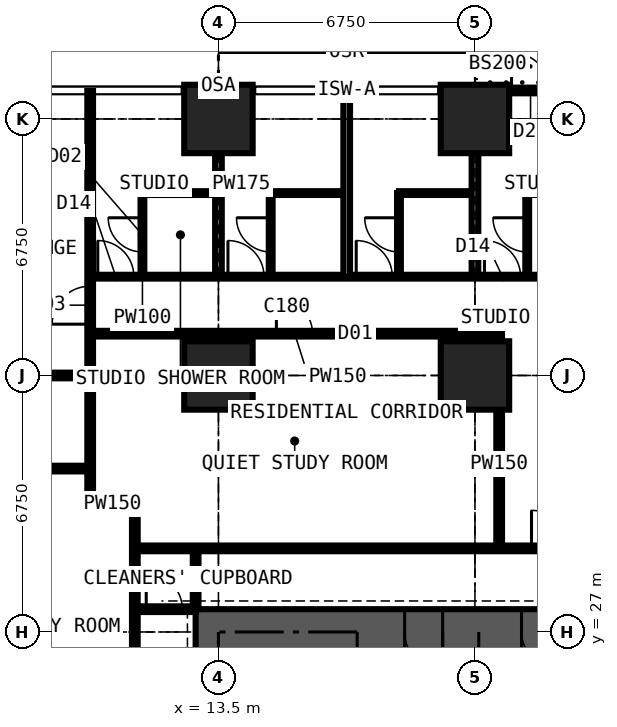
"""IFC4 building model, lengths in metres.
Left out: names, types, materials, properties, quantities, classifications, styles, units other than length and angle.
Written with IfcOpenShell. Run it as: python <this file> out.ifc"""

import sys

from ifc_helpers import new_model, si_unit, direction, frame, frame_2d, origin, origin_2d, place, context, subcontext, project, spatial, rectangle, extrude, element, fill, save


model = new_model("IFC4")
c1 = context("Model", 3, precision=1e-05, world=origin(), true_north=direction((0.0, 1.0)))
c2 = subcontext(c1, "Body", "Model", "MODEL_VIEW")
j1 = project(units=[si_unit("LENGTHUNIT", "METRE"), si_unit("PLANEANGLEUNIT", "RADIAN")], contexts=[c1])
p1 = place(None, origin())
s1 = spatial("IfcSite", under=j1, at=p1, CompositionType="ELEMENT")
p2 = place(p1, origin())
s2 = spatial("IfcBuilding", under=s1, at=p2, CompositionType="ELEMENT")
p3 = place(p2, frame((0.0, 0.0, 50.4)))
s3 = spatial("IfcBuildingStorey", under=s2, at=p3, CompositionType="ELEMENT", Elevation=50.4)
for number, where, z_axis, x_axis in (
    (1, (13.5, 33.75, 0.0), (0.0, 0.0, 1.0), (1.0, 0.0, 0.0)),
    (2, (13.5, 40.5, 0.0), (0.0, 0.0, 1.0), (1.0, 0.0, 0.0)),
    (3, (20.25, 33.75, 0.0), (0.0, 0.0, 1.0), (1.0, 0.0, 0.0)),
    (4, (20.25, 40.5, 0.0), (0.0, 0.0, 1.0), (1.0, 0.0, 0.0)),
):
    element("IfcColumn", number, at=place(p3, frame(where, z_axis=z_axis, x_axis=x_axis)), inside=s3, PredefinedType="COLUMN", context=c2, shape_type="SweptSolid", body=[
        extrude(rectangle(XDim=1.8, YDim=1.8, at=origin_2d()), origin(), (0.0, 0.0, 1.0), 3.6),
    ])
p4 = place(p3, frame((27.6, 27.0, 0.0), z_axis=(0.0, 0.0, 1.0), x_axis=(-1.0, 0.0, 0.0)))
e5 = element("IfcWall", 5, at=p4, inside=s3, PredefinedType="SHEAR", context=c2, shape_type="SweptSolid", body=[
    extrude(rectangle(XDim=14.7, YDim=1.2, at=frame_2d((7.35, 0.0))), origin(), (0.0, 0.0, 1.0), 3.6),
])
p5 = place(p4, frame((5.225, 0.0, 0.0)))
e6 = element("IfcOpeningElement", 6, at=p5, cuts=e5, PredefinedType="OPENING", context=c2, shape_type="SweptSolid", body=[
    extrude(rectangle(XDim=0.9, YDim=2.2, at=frame_2d((0.45, 1.1))), frame((0.0, 0.61, 0.0), z_axis=(0.0, -1.0, 0.0), x_axis=(1.0, 0.0, 0.0)), (0.0, 0.0, 1.0), 1.22),
])
p6 = place(p4, frame((8.2, 0.0, 0.0)))
e7 = element("IfcOpeningElement", 7, at=p6, cuts=e5, PredefinedType="OPENING", context=c2, shape_type="SweptSolid", body=[
    extrude(rectangle(XDim=1.0, YDim=2.2, at=frame_2d((0.5, 1.1))), frame((0.0, 0.61, 0.0), z_axis=(0.0, -1.0, 0.0), x_axis=(1.0, 0.0, 0.0)), (0.0, 0.0, 1.0), 1.22),
])
p7 = place(p3, frame((20.25, 41.25, 0.0), z_axis=(0.0, 0.0, 1.0), x_axis=(1.0, 0.0, 0.0)))
e8 = element("IfcWall", 8, at=p7, inside=s3, PredefinedType="SOLIDWALL", context=c2, shape_type="SweptSolid", body=[
    extrude(rectangle(XDim=6.75, YDim=0.15, at=frame_2d((3.375, 0.0))), origin(), (0.0, 0.0, 1.0), 3.375),
])
p8 = place(p7, frame((0.962, 0.0, 0.0)))
e9 = element("IfcOpeningElement", 9, at=p8, cuts=e8, PredefinedType="OPENING", context=c2, shape_type="SweptSolid", body=[
    extrude(rectangle(XDim=1.0, YDim=2.2, at=frame_2d((0.5, 1.1))), frame((0.0, 0.085, 0.0), z_axis=(0.0, -1.0, 0.0), x_axis=(1.0, 0.0, 0.0)), (0.0, 0.0, 1.0), 0.17),
])
p9 = place(p7, frame((2.025, 0.0, 0.9)))
e10 = element("IfcOpeningElement", 10, at=p9, cuts=e8, PredefinedType="OPENING", context=c2, shape_type="SweptSolid", body=[
    extrude(rectangle(XDim=1.2, YDim=1.8, at=frame_2d((0.6, 0.9))), frame((0.0, 0.085, 0.0), z_axis=(0.0, -1.0, 0.0), x_axis=(1.0, 0.0, 0.0)), (0.0, 0.0, 1.0), 0.17),
])
p10 = place(p7, frame((4.788, 0.0, 0.0)))
e11 = element("IfcOpeningElement", 11, at=p10, cuts=e8, PredefinedType="OPENING", context=c2, shape_type="SweptSolid", body=[
    extrude(rectangle(XDim=1.0, YDim=2.2, at=frame_2d((0.5, 1.1))), frame((0.0, 0.085, 0.0), z_axis=(0.0, -1.0, 0.0), x_axis=(1.0, 0.0, 0.0)), (0.0, 0.0, 1.0), 0.17),
])
p11 = place(p7, frame((3.525, 0.0, 0.9)))
e12 = element("IfcOpeningElement", 12, at=p11, cuts=e8, PredefinedType="OPENING", context=c2, shape_type="SweptSolid", body=[
    extrude(rectangle(XDim=1.2, YDim=1.8, at=frame_2d((0.6, 0.9))), frame((0.0, 0.085, 0.0), z_axis=(0.0, -1.0, 0.0), x_axis=(1.0, 0.0, 0.0)), (0.0, 0.0, 1.0), 0.17),
])
p12 = place(p3, frame((-0.734, 33.75, 0.0), z_axis=(0.0, 0.0, 1.0), x_axis=(1.0, 0.0, 0.0)))
e13 = element("IfcWall", 13, at=p12, inside=s3, PredefinedType="PARTITIONING", context=c2, shape_type="SweptSolid", body=[
    extrude(rectangle(XDim=10.859, YDim=0.15, at=frame_2d((5.429, 0.0))), origin(), (0.0, 0.0, 1.0), 2.877),
])
p13 = place(p3, frame((5.65, 31.3, 0.0), z_axis=(0.0, 0.0, 1.0), x_axis=(1.0, 0.0, 0.0)))
e14 = element("IfcWall", 14, at=p13, inside=s3, PredefinedType="PARTITIONING", context=c2, shape_type="SweptSolid", body=[
    extrude(rectangle(XDim=4.475, YDim=0.15, at=frame_2d((2.238, 0.0))), origin(), (0.0, 0.0, 1.0), 3.375),
])
p14 = place(p3, frame((10.125, 30.375, 0.0), z_axis=(0.0, 0.0, 1.0), x_axis=(0.0, 1.0, 0.0)))
e15 = element("IfcWall", 15, at=p14, inside=s3, PredefinedType="PARTITIONING", context=c2, shape_type="SweptSolid", body=[
    extrude(rectangle(XDim=10.859, YDim=0.15, at=frame_2d((5.429, 0.0))), origin(), (0.0, 0.0, 1.0), 3.375),
])
p15 = place(p14, frame((4.725, 0.0, 0.0)))
e16 = element("IfcOpeningElement", 16, at=p15, cuts=e15, PredefinedType="OPENING", context=c2, shape_type="SweptSolid", body=[
    extrude(rectangle(XDim=1.0, YDim=2.2, at=frame_2d((0.5, 1.1))), frame((0.0, 0.085, 0.0), z_axis=(0.0, -1.0, 0.0), x_axis=(1.0, 0.0, 0.0)), (0.0, 0.0, 1.0), 0.17),
])
p16 = place(p3, frame((10.125, 30.375, 0.0), z_axis=(0.0, 0.0, 1.0), x_axis=(1.0, 0.0, 0.0)))
e17 = element("IfcWall", 17, at=p16, inside=s3, PredefinedType="PARTITIONING", context=c2, shape_type="SweptSolid", body=[
    extrude(rectangle(XDim=1.175, YDim=0.15, at=frame_2d((0.587, 0.0))), origin(), (0.0, 0.0, 1.0), 3.375),
])
p17 = place(p3, frame((10.125, 34.85, 0.0), z_axis=(0.0, 0.0, 1.0), x_axis=(1.0, 0.0, 0.0)))
e18 = element("IfcWall", 18, at=p17, inside=s3, PredefinedType="PARTITIONING", context=c2, shape_type="SweptSolid", body=[
    extrude(rectangle(XDim=10.762, YDim=0.15, at=frame_2d((5.381, 0.0))), origin(), (0.0, 0.0, 1.0), 3.375),
])
p18 = place(p17, frame((4.9, 0.0, 0.0)))
e19 = element("IfcOpeningElement", 19, at=p18, cuts=e18, PredefinedType="OPENING", context=c2, shape_type="SweptSolid", body=[
    extrude(rectangle(XDim=0.95, YDim=2.2, at=frame_2d((0.475, 1.1))), frame((0.0, 0.085, 0.0), z_axis=(0.0, -1.0, 0.0), x_axis=(1.0, 0.0, 0.0)), (0.0, 0.0, 1.0), 0.17),
])
p19 = place(p3, frame((10.125, 36.35, 0.0), z_axis=(0.0, 0.0, 1.0), x_axis=(1.0, 0.0, 0.0)))
e20 = element("IfcWall", 20, at=p19, inside=s3, PredefinedType="PARTITIONING", context=c2, shape_type="SweptSolid", body=[
    extrude(rectangle(XDim=23.625, YDim=0.1, at=frame_2d((11.812, 0.0))), origin(), (0.0, 0.0, 1.0), 3.375),
])
p20 = place(p19, frame((21.45, 0.0, 0.0)))
e21 = element("IfcOpeningElement", 21, at=p20, cuts=e20, PredefinedType="OPENING", context=c2, shape_type="SweptSolid", body=[
    extrude(rectangle(XDim=1.0, YDim=2.2, at=frame_2d((0.5, 1.1))), frame((0.0, 0.06, 0.0), z_axis=(0.0, -1.0, 0.0), x_axis=(1.0, 0.0, 0.0)), (0.0, 0.0, 1.0), 0.12),
])
p21 = place(p19, frame((17.125, 0.0, 0.0)))
e22 = element("IfcOpeningElement", 22, at=p21, cuts=e20, PredefinedType="OPENING", context=c2, shape_type="SweptSolid", body=[
    extrude(rectangle(XDim=0.95, YDim=2.2, at=frame_2d((0.475, 1.1))), frame((0.0, 0.06, 0.0), z_axis=(0.0, -1.0, 0.0), x_axis=(1.0, 0.0, 0.0)), (0.0, 0.0, 1.0), 0.12),
])
p22 = place(p19, frame((13.7, 0.0, 0.0)))
e23 = element("IfcOpeningElement", 23, at=p22, cuts=e20, PredefinedType="OPENING", context=c2, shape_type="SweptSolid", body=[
    extrude(rectangle(XDim=0.95, YDim=2.2, at=frame_2d((0.475, 1.1))), frame((0.0, 0.06, 0.0), z_axis=(0.0, -1.0, 0.0), x_axis=(1.0, 0.0, 0.0)), (0.0, 0.0, 1.0), 0.12),
])
p23 = place(p19, frame((0.2, 0.0, 0.0)))
e24 = element("IfcOpeningElement", 24, at=p23, cuts=e20, PredefinedType="OPENING", context=c2, shape_type="SweptSolid", body=[
    extrude(rectangle(XDim=0.95, YDim=2.2, at=frame_2d((0.475, 1.1))), frame((0.0, 0.06, 0.0), z_axis=(0.0, -1.0, 0.0), x_axis=(1.0, 0.0, 0.0)), (0.0, 0.0, 1.0), 0.12),
])
p24 = place(p19, frame((3.625, 0.0, 0.0)))
e25 = element("IfcOpeningElement", 25, at=p24, cuts=e20, PredefinedType="OPENING", context=c2, shape_type="SweptSolid", body=[
    extrude(rectangle(XDim=0.95, YDim=2.2, at=frame_2d((0.475, 1.1))), frame((0.0, 0.06, 0.0), z_axis=(0.0, -1.0, 0.0), x_axis=(1.0, 0.0, 0.0)), (0.0, 0.0, 1.0), 0.12),
])
p25 = place(p19, frame((7.0, 0.0, 0.0)))
e26 = element("IfcOpeningElement", 26, at=p25, cuts=e20, PredefinedType="OPENING", context=c2, shape_type="SweptSolid", body=[
    extrude(rectangle(XDim=0.95, YDim=2.2, at=frame_2d((0.475, 1.1))), frame((0.0, 0.06, 0.0), z_axis=(0.0, -1.0, 0.0), x_axis=(1.0, 0.0, 0.0)), (0.0, 0.0, 1.0), 0.12),
])
p26 = place(p19, frame((10.375, 0.0, 0.0)))
e27 = element("IfcOpeningElement", 27, at=p26, cuts=e20, PredefinedType="OPENING", context=c2, shape_type="SweptSolid", body=[
    extrude(rectangle(XDim=0.95, YDim=2.2, at=frame_2d((0.475, 1.1))), frame((0.0, 0.06, 0.0), z_axis=(0.0, -1.0, 0.0), x_axis=(1.0, 0.0, 0.0)), (0.0, 0.0, 1.0), 0.12),
])
p27 = place(p3, frame((11.3, 11.3, 0.0), z_axis=(0.0, 0.0, 1.0), x_axis=(0.0, 1.0, 0.0)))
e28 = element("IfcWall", 28, at=p27, inside=s3, PredefinedType="PARTITIONING", context=c2, shape_type="SweptSolid", body=[
    extrude(rectangle(XDim=19.075, YDim=0.15, at=frame_2d((9.538, 0.0))), origin(), (0.0, 0.0, 1.0), 3.375),
])
p28 = place(p27, frame((10.137, 0.0, 0.0)))
e29 = element("IfcOpeningElement", 29, at=p28, cuts=e28, PredefinedType="OPENING", context=c2, shape_type="SweptSolid", body=[
    extrude(rectangle(XDim=1.0, YDim=2.2, at=frame_2d((0.5, 1.1))), frame((0.0, 0.085, 0.0), z_axis=(0.0, -1.0, 0.0), x_axis=(1.0, 0.0, 0.0)), (0.0, 0.0, 1.0), 0.17),
])
p29 = place(p3, frame((11.3, 27.6, 0.0), z_axis=(0.0, 0.0, 1.0), x_axis=(1.0, 0.0, 0.0)))
e30 = element("IfcWall", 30, at=p29, inside=s3, PredefinedType="PARTITIONING", context=c2, shape_type="SweptSolid", body=[
    extrude(rectangle(XDim=1.6, YDim=0.15, at=frame_2d((0.8, 0.0))), origin(), (0.0, 0.0, 1.0), 2.877),
])
p30 = place(p29, frame((0.3, 0.0, 0.0)))
e31 = element("IfcOpeningElement", 31, at=p30, cuts=e30, PredefinedType="OPENING", context=c2, shape_type="SweptSolid", body=[
    extrude(rectangle(XDim=0.95, YDim=2.2, at=frame_2d((0.475, 1.1))), frame((0.0, 0.085, 0.0), z_axis=(0.0, -1.0, 0.0), x_axis=(1.0, 0.0, 0.0)), (0.0, 0.0, 1.0), 0.17),
])
p31 = place(p3, frame((11.3, 29.2, 0.0), z_axis=(0.0, 0.0, 1.0), x_axis=(1.0, 0.0, 0.0)))
e32 = element("IfcWall", 32, at=p31, inside=s3, PredefinedType="PARTITIONING", context=c2, shape_type="SweptSolid", body=[
    extrude(rectangle(XDim=19.075, YDim=0.15, at=frame_2d((9.538, 0.0))), origin(), (0.0, 0.0, 1.0), 3.375),
])
p32 = place(p31, frame((12.875, 0.0, 0.0)))
e33 = element("IfcOpeningElement", 33, at=p32, cuts=e32, PredefinedType="OPENING", context=c2, shape_type="SweptSolid", body=[
    extrude(rectangle(XDim=1.0, YDim=2.2, at=frame_2d((0.5, 1.1))), frame((0.0, 0.085, 0.0), z_axis=(0.0, -1.0, 0.0), x_axis=(1.0, 0.0, 0.0)), (0.0, 0.0, 1.0), 0.17),
])
p33 = place(p31, frame((10.438, 0.0, 0.0)))
e34 = element("IfcOpeningElement", 34, at=p33, cuts=e32, PredefinedType="OPENING", context=c2, shape_type="SweptSolid", body=[
    extrude(rectangle(XDim=1.0, YDim=2.2, at=frame_2d((0.5, 1.1))), frame((0.0, 0.085, 0.0), z_axis=(0.0, -1.0, 0.0), x_axis=(1.0, 0.0, 0.0)), (0.0, 0.0, 1.0), 0.17),
])
p34 = place(p31, frame((15.675, 0.0, 0.0)))
e35 = element("IfcOpeningElement", 35, at=p34, cuts=e32, PredefinedType="OPENING", context=c2, shape_type="SweptSolid", body=[
    extrude(rectangle(XDim=0.95, YDim=2.2, at=frame_2d((0.475, 1.1))), frame((0.0, 0.085, 0.0), z_axis=(0.0, -1.0, 0.0), x_axis=(1.0, 0.0, 0.0)), (0.0, 0.0, 1.0), 0.17),
])
p35 = place(p3, frame((11.5, 36.35, 0.0), z_axis=(0.0, 0.0, 1.0), x_axis=(0.0, 1.0, 0.0)))
e36 = element("IfcWall", 36, at=p35, inside=s3, PredefinedType="PARTITIONING", context=c2, shape_type="SweptSolid", body=[
    extrude(rectangle(XDim=2.2, YDim=0.1, at=frame_2d((1.1, 0.0))), origin(), (0.0, 0.0, 1.0), 3.375),
])
p36 = place(p35, frame((0.65, 0.0, 0.0)))
e37 = element("IfcOpeningElement", 37, at=p36, cuts=e36, PredefinedType="OPENING", context=c2, shape_type="SweptSolid", body=[
    extrude(rectangle(XDim=0.9, YDim=2.2, at=frame_2d((0.45, 1.1))), frame((0.0, 0.06, 0.0), z_axis=(0.0, -1.0, 0.0), x_axis=(1.0, 0.0, 0.0)), (0.0, 0.0, 1.0), 0.12),
])
p37 = place(p3, frame((11.5, 38.55, 0.0), z_axis=(0.0, 0.0, 1.0), x_axis=(1.0, 0.0, 0.0)))
e38 = element("IfcWall", 38, at=p37, inside=s3, PredefinedType="PARTITIONING", context=c2, shape_type="SweptSolid", body=[
    extrude(rectangle(XDim=2.0, YDim=0.1, at=frame_2d((1.0, 0.0))), origin(), (0.0, 0.0, 1.0), 3.375),
])
p38 = place(p3, frame((12.9, 27.6, 0.0), z_axis=(0.0, 0.0, 1.0), x_axis=(0.0, 1.0, 0.0)))
e39 = element("IfcWall", 39, at=p38, inside=s3, PredefinedType="PARTITIONING", context=c2, shape_type="SweptSolid", body=[
    extrude(rectangle(XDim=1.6, YDim=0.15, at=frame_2d((0.8, 0.0))), origin(), (0.0, 0.0, 1.0), 3.375),
])
p39 = place(p3, frame((13.5, 36.35, 0.0), z_axis=(0.0, 0.0, 1.0), x_axis=(0.0, 1.0, 0.0)))
e40 = element("IfcWall", 40, at=p39, inside=s3, PredefinedType="PARTITIONING", context=c2, shape_type="SweptSolid", body=[
    extrude(rectangle(XDim=4.884, YDim=0.175, at=frame_2d((2.442, 0.0))), origin(), (0.0, 0.0, 1.0), 2.61),
])
p40 = place(p3, frame((14.875, 36.35, 0.0), z_axis=(0.0, 0.0, 1.0), x_axis=(0.0, 1.0, 0.0)))
e41 = element("IfcWall", 41, at=p40, inside=s3, PredefinedType="PARTITIONING", context=c2, shape_type="SweptSolid", body=[
    extrude(rectangle(XDim=2.2, YDim=0.1, at=frame_2d((1.1, 0.0))), origin(), (0.0, 0.0, 1.0), 3.375),
])
p41 = place(p40, frame((0.65, 0.0, 0.0)))
e42 = element("IfcOpeningElement", 42, at=p41, cuts=e41, PredefinedType="OPENING", context=c2, shape_type="SweptSolid", body=[
    extrude(rectangle(XDim=0.9, YDim=2.2, at=frame_2d((0.45, 1.1))), frame((0.0, 0.06, 0.0), z_axis=(0.0, -1.0, 0.0), x_axis=(1.0, 0.0, 0.0)), (0.0, 0.0, 1.0), 0.12),
])
p42 = place(p3, frame((14.875, 38.55, 0.0), z_axis=(0.0, 0.0, 1.0), x_axis=(1.0, 0.0, 0.0)))
e43 = element("IfcWall", 43, at=p42, inside=s3, PredefinedType="PARTITIONING", context=c2, shape_type="SweptSolid", body=[
    extrude(rectangle(XDim=2.0, YDim=0.1, at=frame_2d((1.0, 0.0))), origin(), (0.0, 0.0, 1.0), 3.375),
])
p43 = place(p3, frame((16.875, 36.35, 0.0), z_axis=(0.0, 0.0, 1.0), x_axis=(0.0, 1.0, 0.0)))
e44 = element("IfcWall", 44, at=p43, inside=s3, PredefinedType="PARTITIONING", context=c2, shape_type="SweptSolid", body=[
    extrude(rectangle(XDim=4.884, YDim=0.175, at=frame_2d((2.442, 0.0))), origin(), (0.0, 0.0, 1.0), 3.375),
])
p44 = place(p3, frame((18.25, 36.35, 0.0), z_axis=(0.0, 0.0, 1.0), x_axis=(0.0, 1.0, 0.0)))
e45 = element("IfcWall", 45, at=p44, inside=s3, PredefinedType="PARTITIONING", context=c2, shape_type="SweptSolid", body=[
    extrude(rectangle(XDim=2.2, YDim=0.1, at=frame_2d((1.1, 0.0))), origin(), (0.0, 0.0, 1.0), 3.375),
])
p45 = place(p44, frame((0.65, 0.0, 0.0)))
e46 = element("IfcOpeningElement", 46, at=p45, cuts=e45, PredefinedType="OPENING", context=c2, shape_type="SweptSolid", body=[
    extrude(rectangle(XDim=0.9, YDim=2.2, at=frame_2d((0.45, 1.1))), frame((0.0, 0.06, 0.0), z_axis=(0.0, -1.0, 0.0), x_axis=(1.0, 0.0, 0.0)), (0.0, 0.0, 1.0), 0.12),
])
p46 = place(p3, frame((18.25, 38.55, 0.0), z_axis=(0.0, 0.0, 1.0), x_axis=(1.0, 0.0, 0.0)))
e47 = element("IfcWall", 47, at=p46, inside=s3, PredefinedType="PARTITIONING", context=c2, shape_type="SweptSolid", body=[
    extrude(rectangle(XDim=2.0, YDim=0.1, at=frame_2d((1.0, 0.0))), origin(), (0.0, 0.0, 1.0), 3.375),
])
p47 = place(p3, frame((20.25, 36.35, 0.0), z_axis=(0.0, 0.0, 1.0), x_axis=(0.0, 1.0, 0.0)))
e48 = element("IfcWall", 48, at=p47, inside=s3, PredefinedType="PARTITIONING", context=c2, shape_type="SweptSolid", body=[
    extrude(rectangle(XDim=4.884, YDim=0.175, at=frame_2d((2.442, 0.0))), origin(), (0.0, 0.0, 1.0), 2.61),
])
p48 = place(p3, frame((20.887, 29.2, 0.0), z_axis=(0.0, 0.0, 1.0), x_axis=(0.0, 1.0, 0.0)))
e49 = element("IfcWall", 49, at=p48, inside=s3, PredefinedType="PARTITIONING", context=c2, shape_type="SweptSolid", body=[
    extrude(rectangle(XDim=5.65, YDim=0.15, at=frame_2d((2.825, 0.0))), origin(), (0.0, 0.0, 1.0), 3.375),
])
p49 = place(p3, frame((21.625, 36.35, 0.0), z_axis=(0.0, 0.0, 1.0), x_axis=(0.0, 1.0, 0.0)))
e50 = element("IfcWall", 50, at=p49, inside=s3, PredefinedType="PARTITIONING", context=c2, shape_type="SweptSolid", body=[
    extrude(rectangle(XDim=2.2, YDim=0.1, at=frame_2d((1.1, 0.0))), origin(), (0.0, 0.0, 1.0), 3.375),
])
p50 = place(p49, frame((0.65, 0.0, 0.0)))
e51 = element("IfcOpeningElement", 51, at=p50, cuts=e50, PredefinedType="OPENING", context=c2, shape_type="SweptSolid", body=[
    extrude(rectangle(XDim=0.9, YDim=2.2, at=frame_2d((0.45, 1.1))), frame((0.0, 0.06, 0.0), z_axis=(0.0, -1.0, 0.0), x_axis=(1.0, 0.0, 0.0)), (0.0, 0.0, 1.0), 0.12),
])
p51 = place(p3, frame((21.625, 38.55, 0.0), z_axis=(0.0, 0.0, 1.0), x_axis=(1.0, 0.0, 0.0)))
e52 = element("IfcWall", 52, at=p51, inside=s3, PredefinedType="PARTITIONING", context=c2, shape_type="SweptSolid", body=[
    extrude(rectangle(XDim=2.0, YDim=0.1, at=frame_2d((1.0, 0.0))), origin(), (0.0, 0.0, 1.0), 3.375),
])
p52 = place(p8, origin())
e53 = element("IfcDoor", 53, at=p52, inside=s3, OperationType="SINGLE_SWING_LEFT", PredefinedType="DOOR", context=c2, shape_type="SweptSolid", body=[
    extrude(rectangle(XDim=1.0, YDim=2.2, at=frame_2d((0.5, 1.1))), frame((0.0, 0.025, 0.0), z_axis=(0.0, -1.0, 0.0), x_axis=(1.0, 0.0, 0.0)), (0.0, 0.0, 1.0), 0.05),
])
fill(e9, e53)
p53 = place(p5, origin())
e54 = element("IfcDoor", 54, at=p53, inside=s3, OperationType="SINGLE_SWING_LEFT", PredefinedType="DOOR", context=c2, shape_type="SweptSolid", body=[
    extrude(rectangle(XDim=0.9, YDim=2.2, at=frame_2d((0.45, 1.1))), frame((0.0, 0.4, 0.0), z_axis=(0.0, -1.0, 0.0), x_axis=(1.0, 0.0, 0.0)), (0.0, 0.0, 1.0), 0.8),
])
fill(e6, e54)
p54 = place(p6, origin())
e55 = element("IfcDoor", 55, at=p54, inside=s3, OperationType="SINGLE_SWING_LEFT", PredefinedType="DOOR", context=c2, shape_type="SweptSolid", body=[
    extrude(rectangle(XDim=1.0, YDim=2.2, at=frame_2d((0.5, 1.1))), frame((0.0, 0.025, 0.0), z_axis=(0.0, -1.0, 0.0), x_axis=(1.0, 0.0, 0.0)), (0.0, 0.0, 1.0), 0.05),
])
fill(e7, e55)
p55 = place(p30, origin())
e56 = element("IfcDoor", 56, at=p55, inside=s3, OperationType="SINGLE_SWING_LEFT", PredefinedType="DOOR", context=c2, shape_type="SweptSolid", body=[
    extrude(rectangle(XDim=0.95, YDim=2.2, at=frame_2d((0.475, 1.1))), frame((0.0, 0.025, 0.0), z_axis=(0.0, -1.0, 0.0), x_axis=(1.0, 0.0, 0.0)), (0.0, 0.0, 1.0), 0.05),
])
fill(e31, e56)
p56 = place(p23, origin())
e57 = element("IfcDoor", 57, at=p56, inside=s3, OperationType="SINGLE_SWING_LEFT", PredefinedType="DOOR", context=c2, shape_type="SweptSolid", body=[
    extrude(rectangle(XDim=0.95, YDim=2.2, at=frame_2d((0.475, 1.1))), frame((0.0, 0.025, 0.0), z_axis=(0.0, -1.0, 0.0), x_axis=(1.0, 0.0, 0.0)), (0.0, 0.0, 1.0), 0.05),
])
fill(e24, e57)
p57 = place(p36, origin())
e58 = element("IfcDoor", 58, at=p57, inside=s3, OperationType="SINGLE_SWING_RIGHT", PredefinedType="DOOR", context=c2, shape_type="SweptSolid", body=[
    extrude(rectangle(XDim=0.9, YDim=2.2, at=frame_2d((0.45, 1.1))), frame((0.0, 0.025, 0.0), z_axis=(0.0, -1.0, 0.0), x_axis=(1.0, 0.0, 0.0)), (0.0, 0.0, 1.0), 0.05),
])
fill(e37, e58)
p58 = place(p24, origin())
e59 = element("IfcDoor", 59, at=p58, inside=s3, OperationType="SINGLE_SWING_LEFT", PredefinedType="DOOR", context=c2, shape_type="SweptSolid", body=[
    extrude(rectangle(XDim=0.95, YDim=2.2, at=frame_2d((0.475, 1.1))), frame((0.0, 0.025, 0.0), z_axis=(0.0, -1.0, 0.0), x_axis=(1.0, 0.0, 0.0)), (0.0, 0.0, 1.0), 0.05),
])
fill(e25, e59)
p59 = place(p41, origin())
e60 = element("IfcDoor", 60, at=p59, inside=s3, OperationType="SINGLE_SWING_RIGHT", PredefinedType="DOOR", context=c2, shape_type="SweptSolid", body=[
    extrude(rectangle(XDim=0.9, YDim=2.2, at=frame_2d((0.45, 1.1))), frame((0.0, 0.025, 0.0), z_axis=(0.0, -1.0, 0.0), x_axis=(1.0, 0.0, 0.0)), (0.0, 0.0, 1.0), 0.05),
])
fill(e42, e60)
p60 = place(p25, origin())
e61 = element("IfcDoor", 61, at=p60, inside=s3, OperationType="SINGLE_SWING_LEFT", PredefinedType="DOOR", context=c2, shape_type="SweptSolid", body=[
    extrude(rectangle(XDim=0.95, YDim=2.2, at=frame_2d((0.475, 1.1))), frame((0.0, 0.025, 0.0), z_axis=(0.0, -1.0, 0.0), x_axis=(1.0, 0.0, 0.0)), (0.0, 0.0, 1.0), 0.05),
])
fill(e26, e61)
p61 = place(p45, origin())
e62 = element("IfcDoor", 62, at=p61, inside=s3, OperationType="SINGLE_SWING_RIGHT", PredefinedType="DOOR", context=c2, shape_type="SweptSolid", body=[
    extrude(rectangle(XDim=0.9, YDim=2.2, at=frame_2d((0.45, 1.1))), frame((0.0, 0.025, 0.0), z_axis=(0.0, -1.0, 0.0), x_axis=(1.0, 0.0, 0.0)), (0.0, 0.0, 1.0), 0.05),
])
fill(e46, e62)
p62 = place(p26, origin())
e63 = element("IfcDoor", 63, at=p62, inside=s3, OperationType="SINGLE_SWING_LEFT", PredefinedType="DOOR", context=c2, shape_type="SweptSolid", body=[
    extrude(rectangle(XDim=0.95, YDim=2.2, at=frame_2d((0.475, 1.1))), frame((0.0, 0.025, 0.0), z_axis=(0.0, -1.0, 0.0), x_axis=(1.0, 0.0, 0.0)), (0.0, 0.0, 1.0), 0.05),
])
fill(e27, e63)
p63 = place(p50, origin())
e64 = element("IfcDoor", 64, at=p63, inside=s3, OperationType="SINGLE_SWING_RIGHT", PredefinedType="DOOR", context=c2, shape_type="SweptSolid", body=[
    extrude(rectangle(XDim=0.9, YDim=2.2, at=frame_2d((0.45, 1.1))), frame((0.0, 0.025, 0.0), z_axis=(0.0, -1.0, 0.0), x_axis=(1.0, 0.0, 0.0)), (0.0, 0.0, 1.0), 0.05),
])
fill(e51, e64)
p64 = place(p33, origin())
e65 = element("IfcDoor", 65, at=p64, inside=s3, OperationType="SINGLE_SWING_LEFT", PredefinedType="DOOR", context=c2, shape_type="SweptSolid", body=[
    extrude(rectangle(XDim=1.0, YDim=2.2, at=frame_2d((0.5, 1.1))), frame((0.0, 0.025, 0.0), z_axis=(0.0, -1.0, 0.0), x_axis=(1.0, 0.0, 0.0)), (0.0, 0.0, 1.0), 0.05),
])
fill(e34, e65)
p65 = place(p18, origin())
e66 = element("IfcDoor", 66, at=p65, inside=s3, OperationType="SINGLE_SWING_LEFT", PredefinedType="DOOR", context=c2, shape_type="SweptSolid", body=[
    extrude(rectangle(XDim=0.95, YDim=2.2, at=frame_2d((0.475, 1.1))), frame((0.0, 0.025, 0.0), z_axis=(0.0, -1.0, 0.0), x_axis=(1.0, 0.0, 0.0)), (0.0, 0.0, 1.0), 0.05),
])
fill(e19, e66)
p66 = place(p15, origin())
e67 = element("IfcDoor", 67, at=p66, inside=s3, OperationType="SINGLE_SWING_LEFT", PredefinedType="DOOR", context=c2, shape_type="SweptSolid", body=[
    extrude(rectangle(XDim=1.0, YDim=2.2, at=frame_2d((0.5, 1.1))), frame((0.0, 0.025, 0.0), z_axis=(0.0, -1.0, 0.0), x_axis=(1.0, 0.0, 0.0)), (0.0, 0.0, 1.0), 0.05),
])
fill(e16, e67)
save(model, sys.argv[1])
